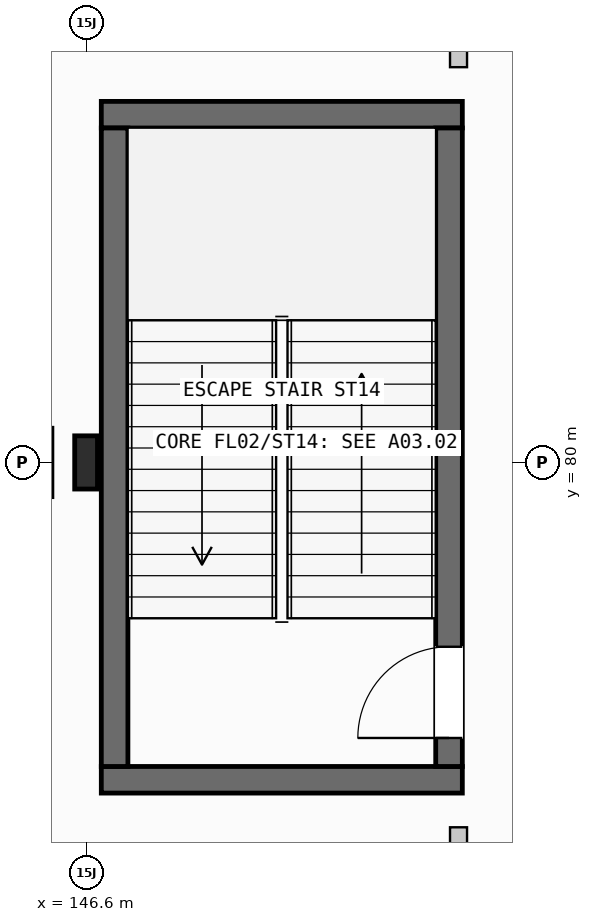
"""IFC4 building model, lengths in metres.
Left out: names, types, materials, properties, quantities, classifications, styles, units other than length and angle.
Written with IfcOpenShell. Run it as: python <this file> out.ifc"""

import sys

from ifc_helpers import new_model, si_unit, direction, frame, frame_2d, origin, origin_2d, place, context, subcontext, project, spatial, rectangle, i_section, extrude, element, fill, save


model = new_model("IFC4")
c1 = context("Model", 3, precision=1e-05, world=origin(), true_north=direction((0.0, 1.0)))
c2 = subcontext(c1, "Body", "Model", "MODEL_VIEW")
j1 = project(units=[si_unit("LENGTHUNIT", "METRE"), si_unit("PLANEANGLEUNIT", "RADIAN")], contexts=[c1])
p1 = place(None, origin())
s1 = spatial("IfcSite", under=j1, at=p1, CompositionType="ELEMENT")
p2 = place(p1, origin())
s2 = spatial("IfcBuilding", under=s1, at=p2, CompositionType="ELEMENT")
p3 = place(p2, frame((0.0, 0.0, -5.4)))
s3 = spatial("IfcBuildingStorey", under=s2, at=p3, CompositionType="ELEMENT", Elevation=-5.4)
p4 = place(p3, frame((146.0, 80.0, 0.0), z_axis=(0.0, 0.0, 1.0), x_axis=(1.0, 0.0, 0.0)))
e1 = element("IfcColumn", 1, at=p4, inside=s3, PredefinedType="COLUMN", context=c2, shape_type="SweptSolid", body=[
    extrude(i_section(OverallWidth=0.3, OverallDepth=0.9, WebThickness=0.019, FlangeThickness=0.035, FilletRadius=0.03, at=origin_2d()), origin(), (0.0, 0.0, 1.0), 5.4),
])
p5 = place(p3, frame((146.6, 80.0, 0.0), z_axis=(0.0, 0.0, 1.0), x_axis=(1.0, 0.0, 0.0)))
e2 = element("IfcColumn", 2, at=p5, inside=s3, PredefinedType="COLUMN", context=c2, shape_type="SweptSolid", body=[
    extrude(i_section(OverallWidth=0.3, OverallDepth=0.7, WebThickness=0.017, FlangeThickness=0.032, FilletRadius=0.027, at=origin_2d()), origin(), (0.0, 0.0, 1.0), 5.4),
])
for number, where, z_axis, x_axis in (
    (3, (146.8, 75.825, 0.0), (0.0, 0.0, 1.0), (1.0, 0.0, 0.0)),
    (4, (146.8, 84.575, 0.0), (0.0, 0.0, 1.0), (1.0, 0.0, 0.0)),
):
    element("IfcWall", number, at=place(p3, frame(where, z_axis=z_axis, x_axis=x_axis)), inside=s3, PredefinedType="SHEAR", context=c2, shape_type="SweptSolid", body=[
        extrude(rectangle(XDim=4.75, YDim=0.35, at=frame_2d((2.375, 0.0))), origin(), (0.0, 0.0, 1.0), 5.4),
    ])
p6 = place(p3, frame((146.975, 76.0, 0.0), z_axis=(0.0, 0.0, 1.0), x_axis=(0.0, 1.0, 0.0)))
e5 = element("IfcWall", 5, at=p6, inside=s3, PredefinedType="SHEAR", context=c2, shape_type="SweptSolid", body=[
    extrude(rectangle(XDim=8.4, YDim=0.35, at=frame_2d((4.2, 0.0))), origin(), (0.0, 0.0, 1.0), 5.4),
])
p7 = place(p3, frame((151.375, 76.0, 0.0), z_axis=(0.0, 0.0, 1.0), x_axis=(0.0, 1.0, 0.0)))
e6 = element("IfcWall", 6, at=p7, inside=s3, PredefinedType="SHEAR", context=c2, shape_type="SweptSolid", body=[
    extrude(rectangle(XDim=8.4, YDim=0.35, at=frame_2d((4.2, 0.0))), origin(), (0.0, 0.0, 1.0), 5.4),
])
p8 = place(p7, frame((0.375, 0.0, 0.0)))
e7 = element("IfcOpeningElement", 7, at=p8, cuts=e6, PredefinedType="OPENING", context=c2, shape_type="SweptSolid", body=[
    extrude(rectangle(XDim=1.2, YDim=2.2, at=frame_2d((0.6, 1.1))), frame((0.0, 0.185, 0.0), z_axis=(0.0, -1.0, 0.0), x_axis=(1.0, 0.0, 0.0)), (0.0, 0.0, 1.0), 0.37),
])
p9 = place(p3, frame((151.5, 56.5, 0.0), z_axis=(0.0, 0.0, 1.0), x_axis=(0.0, 1.0, 0.0)))
e8 = element("IfcWall", 8, at=p9, inside=s3, PredefinedType="PARTITIONING", context=c2, shape_type="SweptSolid", body=[
    extrude(rectangle(XDim=18.7, YDim=0.224, at=frame_2d((9.35, 0.0))), origin(), (0.0, 0.0, 1.0), 4.4),
])
p10 = place(p9, frame((8.71, 0.0, 0.0)))
e9 = element("IfcOpeningElement", 9, at=p10, cuts=e8, PredefinedType="OPENING", context=c2, shape_type="SweptSolid", body=[
    extrude(rectangle(XDim=1.28, YDim=2.24, at=frame_2d((0.64, 1.12))), frame((0.0, 0.122, 0.0), z_axis=(0.0, -1.0, 0.0), x_axis=(1.0, 0.0, 0.0)), (0.0, 0.0, 1.0), 0.244),
])
p11 = place(p3, frame((151.5, 85.2, 0.0), z_axis=(0.0, 0.0, 1.0), x_axis=(0.0, 1.0, 0.0)))
e10 = element("IfcWall", 10, at=p11, inside=s3, PredefinedType="PARTITIONING", context=c2, shape_type="SweptSolid", body=[
    extrude(rectangle(XDim=14.9, YDim=0.224, at=frame_2d((7.45, 0.0))), origin(), (0.0, 0.0, 1.0), 4.4),
])
p12 = place(p11, frame((6.81, 0.0, 0.0)))
e11 = element("IfcOpeningElement", 11, at=p12, cuts=e10, PredefinedType="OPENING", context=c2, shape_type="SweptSolid", body=[
    extrude(rectangle(XDim=1.28, YDim=2.24, at=frame_2d((0.64, 1.12))), frame((0.0, 0.122, 0.0), z_axis=(0.0, -1.0, 0.0), x_axis=(1.0, 0.0, 0.0)), (0.0, 0.0, 1.0), 0.244),
])
p13 = place(p8, origin())
e12 = element("IfcDoor", 12, at=p13, inside=s3, OperationType="SINGLE_SWING_LEFT", PredefinedType="DOOR", context=c2, shape_type="SweptSolid", body=[
    extrude(rectangle(XDim=1.2, YDim=2.2, at=frame_2d((0.6, 1.1))), frame((0.0, 0.025, 0.0), z_axis=(0.0, -1.0, 0.0), x_axis=(1.0, 0.0, 0.0)), (0.0, 0.0, 1.0), 0.05),
])
fill(e7, e12)
save(model, sys.argv[1])
